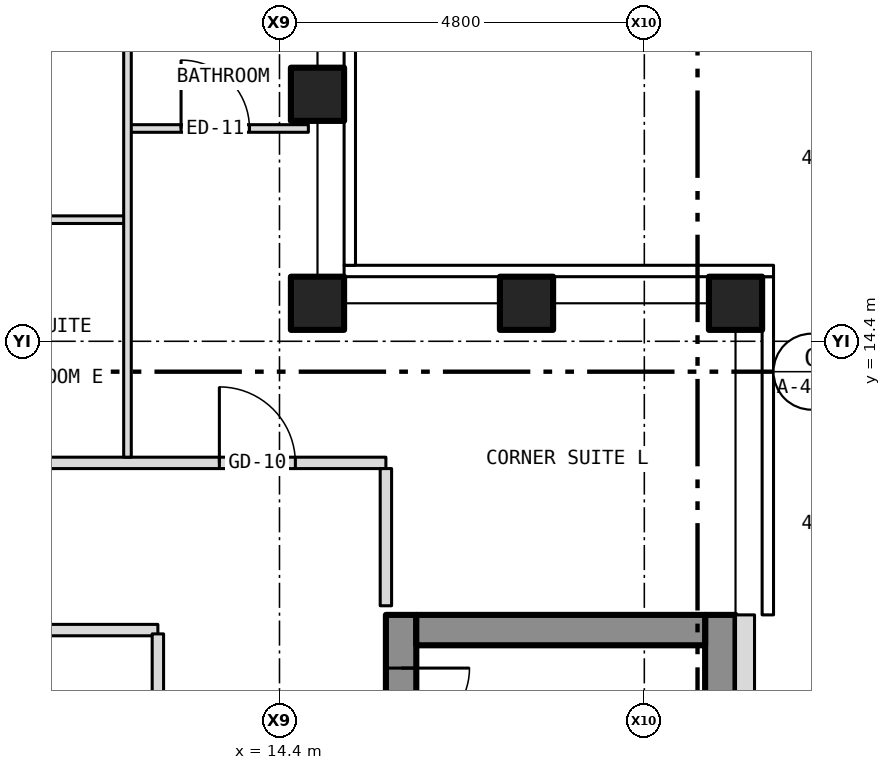
"""IFC4 building model, lengths in metres.
Left out: names, types, materials, properties, quantities, classifications, styles, units other than length and angle.
Written with IfcOpenShell. Run it as: python <this file> out.ifc"""

import sys

from ifc_helpers import new_model, si_unit, direction, frame, frame_2d, origin, origin_2d, place, context, subcontext, project, spatial, rectangle, hollow_rectangle, extrude, element, fill, save


model = new_model("IFC4")
c1 = context("Model", 3, precision=1e-05, world=origin(), true_north=direction((0.0, 1.0)))
c2 = subcontext(c1, "Body", "Model", "MODEL_VIEW")
j1 = project(units=[si_unit("LENGTHUNIT", "METRE"), si_unit("PLANEANGLEUNIT", "RADIAN")], contexts=[c1])
p1 = place(None, origin())
s1 = spatial("IfcSite", under=j1, at=p1, CompositionType="ELEMENT")
p2 = place(p1, origin())
s2 = spatial("IfcBuilding", under=s1, at=p2, CompositionType="ELEMENT")
p3 = place(p2, frame((0.0, 0.0, 208.5)))
s3 = spatial("IfcBuildingStorey", under=s2, at=p3, CompositionType="ELEMENT", Elevation=208.5)
for number, where, z_axis, x_axis in (
    (1, (20.4, 14.9, -0.15), (0.0, 0.0, 1.0), (1.0, 0.0, 0.0)),
    (2, (14.9, 14.9, -0.15), (0.0, 0.0, 1.0), (1.0, 0.0, 0.0)),
    (3, (14.9, 17.65, -0.15), (0.0, 0.0, 1.0), (1.0, 0.0, 0.0)),
    (4, (17.65, 14.9, -0.15), (0.0, 0.0, 1.0), (1.0, 0.0, 0.0)),
):
    element("IfcColumn", number, at=place(p3, frame(where, z_axis=z_axis, x_axis=x_axis)), inside=s3, PredefinedType="COLUMN", context=c2, shape_type="SweptSolid", body=[
        extrude(hollow_rectangle(XDim=0.7, YDim=0.7, WallThickness=0.04, at=origin_2d()), origin(), (0.0, 0.0, 1.0), 3.5),
    ])
p4 = place(p3, frame((16.0, -10.8, 0.0), z_axis=(0.0, 0.0, 1.0), x_axis=(0.0, 1.0, 0.0)))
e5 = element("IfcWall", 5, at=p4, inside=s3, PredefinedType="SHEAR", context=c2, shape_type="SweptSolid", body=[
    extrude(rectangle(XDim=21.6, YDim=0.4, at=frame_2d((10.8, 0.0))), origin(), (0.0, 0.0, 1.0), 3.25),
])
p5 = place(p4, frame((9.4, 0.0, 0.0)))
e6 = element("IfcOpeningElement", 6, at=p5, cuts=e5, PredefinedType="OPENING", context=c2, shape_type="SweptSolid", body=[
    extrude(rectangle(XDim=1.1, YDim=2.1, at=frame_2d((0.55, 1.05))), frame((0.0, 0.212, 0.0), z_axis=(0.0, -1.0, 0.0), x_axis=(1.0, 0.0, 0.0)), (0.0, 0.0, 1.0), 0.424),
])
p6 = place(p4, frame((11.5, 0.0, 0.0)))
e7 = element("IfcOpeningElement", 7, at=p6, cuts=e5, PredefinedType="OPENING", context=c2, shape_type="SweptSolid", body=[
    extrude(rectangle(XDim=1.1, YDim=2.1, at=frame_2d((0.55, 1.05))), frame((0.0, 0.212, 0.0), z_axis=(0.0, -1.0, 0.0), x_axis=(1.0, 0.0, 0.0)), (0.0, 0.0, 1.0), 0.424),
])
p7 = place(p4, frame((13.6, 0.0, 0.0)))
e8 = element("IfcOpeningElement", 8, at=p7, cuts=e5, PredefinedType="OPENING", context=c2, shape_type="SweptSolid", body=[
    extrude(rectangle(XDim=1.1, YDim=2.1, at=frame_2d((0.55, 1.05))), frame((0.0, 0.212, 0.0), z_axis=(0.0, -1.0, 0.0), x_axis=(1.0, 0.0, 0.0)), (0.0, 0.0, 1.0), 0.424),
])
p8 = place(p4, frame((15.7, 0.0, 0.0)))
e9 = element("IfcOpeningElement", 9, at=p8, cuts=e5, PredefinedType="OPENING", context=c2, shape_type="SweptSolid", body=[
    extrude(rectangle(XDim=1.1, YDim=2.1, at=frame_2d((0.55, 1.05))), frame((0.0, 0.212, 0.0), z_axis=(0.0, -1.0, 0.0), x_axis=(1.0, 0.0, 0.0)), (0.0, 0.0, 1.0), 0.424),
])
p9 = place(p4, frame((17.8, 0.0, 0.0)))
e10 = element("IfcOpeningElement", 10, at=p9, cuts=e5, PredefinedType="OPENING", context=c2, shape_type="SweptSolid", body=[
    extrude(rectangle(XDim=1.1, YDim=2.1, at=frame_2d((0.55, 1.05))), frame((0.0, 0.212, 0.0), z_axis=(0.0, -1.0, 0.0), x_axis=(1.0, 0.0, 0.0)), (0.0, 0.0, 1.0), 0.424),
])
p10 = place(p4, frame((5.642, 0.0, 0.0)))
e11 = element("IfcOpeningElement", 11, at=p10, cuts=e5, PredefinedType="OPENING", context=c2, shape_type="SweptSolid", body=[
    extrude(rectangle(XDim=1.1, YDim=2.1, at=frame_2d((0.55, 1.05))), frame((0.0, 0.212, 0.0), z_axis=(0.0, -1.0, 0.0), x_axis=(1.0, 0.0, 0.0)), (0.0, 0.0, 1.0), 0.424),
])
p11 = place(p4, frame((7.5, 0.0, 0.0)))
e12 = element("IfcOpeningElement", 12, at=p11, cuts=e5, PredefinedType="OPENING", context=c2, shape_type="SweptSolid", body=[
    extrude(rectangle(XDim=1.1, YDim=2.1, at=frame_2d((0.55, 1.05))), frame((0.0, 0.212, 0.0), z_axis=(0.0, -1.0, 0.0), x_axis=(1.0, 0.0, 0.0)), (0.0, 0.0, 1.0), 0.424),
])
p12 = place(p4, frame((20.0, 0.0, 0.0)))
e13 = element("IfcOpeningElement", 13, at=p12, cuts=e5, PredefinedType="OPENING", context=c2, shape_type="SweptSolid", body=[
    extrude(rectangle(XDim=0.9, YDim=2.1, at=frame_2d((0.45, 1.05))), frame((0.0, 0.212, 0.0), z_axis=(0.0, -1.0, 0.0), x_axis=(1.0, 0.0, 0.0)), (0.0, 0.0, 1.0), 0.424),
])
p13 = place(p3, frame((20.2, -10.8, 0.0), z_axis=(0.0, 0.0, 1.0), x_axis=(0.0, 1.0, 0.0)))
e14 = element("IfcWall", 14, at=p13, inside=s3, PredefinedType="SHEAR", context=c2, shape_type="SweptSolid", body=[
    extrude(rectangle(XDim=21.6, YDim=0.4, at=frame_2d((10.8, 0.0))), origin(), (0.0, 0.0, 1.0), 3.25),
])
p14 = place(p3, frame((16.2, 10.6, 0.0), z_axis=(0.0, 0.0, 1.0), x_axis=(1.0, 0.0, 0.0)))
e15 = element("IfcWall", 15, at=p14, inside=s3, PredefinedType="SHEAR", context=c2, shape_type="SweptSolid", body=[
    extrude(rectangle(XDim=3.8, YDim=0.4, at=frame_2d((1.9, 0.0))), origin(), (0.0, 0.0, 1.0), 3.25),
])
p15 = place(p3, frame((20.525, -10.8, 0.0), z_axis=(0.0, 0.0, 1.0), x_axis=(0.0, 1.0, 0.0)))
e16 = element("IfcWall", 16, at=p15, inside=s3, PredefinedType="SOLIDWALL", context=c2, shape_type="SweptSolid", body=[
    extrude(rectangle(XDim=21.6, YDim=0.25, at=frame_2d((10.8, 0.0))), origin(), (0.0, 0.0, 1.0), 3.5),
])
p16 = place(p15, frame((2.95, 0.0, 1.0)))
e17 = element("IfcOpeningElement", 17, at=p16, cuts=e16, PredefinedType="OPENING", context=c2, shape_type="SweptSolid", body=[
    extrude(rectangle(XDim=0.6, YDim=1.5, at=frame_2d((0.3, 0.75))), frame((0.0, 0.137, 0.0), z_axis=(0.0, -1.0, 0.0), x_axis=(1.0, 0.0, 0.0)), (0.0, 0.0, 1.0), 0.274),
])
p17 = place(p3, frame((3.3, 10.6, 0.0), z_axis=(0.0, 0.0, 1.0), x_axis=(1.0, 0.0, 0.0)))
e18 = element("IfcWall", 18, at=p17, inside=s3, PredefinedType="PARTITIONING", context=c2, shape_type="SweptSolid", body=[
    extrude(rectangle(XDim=9.5, YDim=0.15, at=frame_2d((4.75, 0.0))), origin(), (0.0, 0.0, 1.0), 3.35),
])
p18 = place(p17, frame((1.925, 0.0, 0.0)))
e19 = element("IfcOpeningElement", 19, at=p18, cuts=e18, PredefinedType="OPENING", context=c2, shape_type="SweptSolid", body=[
    extrude(rectangle(XDim=0.9, YDim=2.1, at=frame_2d((0.45, 1.05))), frame((0.0, 0.087, 0.0), z_axis=(0.0, -1.0, 0.0), x_axis=(1.0, 0.0, 0.0)), (0.0, 0.0, 1.0), 0.174),
])
p19 = place(p3, frame((-15.8, 12.8, 0.0), z_axis=(0.0, 0.0, 1.0), x_axis=(1.0, 0.0, 0.0)))
e20 = element("IfcWall", 20, at=p19, inside=s3, PredefinedType="PARTITIONING", context=c2, shape_type="SweptSolid", body=[
    extrude(rectangle(XDim=31.6, YDim=0.15, at=frame_2d((15.8, 0.0))), origin(), (0.0, 0.0, 1.0), 3.35),
])
p20 = place(p19, frame((5.417, 0.0, 0.0)))
e21 = element("IfcOpeningElement", 21, at=p20, cuts=e20, PredefinedType="OPENING", context=c2, shape_type="SweptSolid", body=[
    extrude(rectangle(XDim=0.9, YDim=2.1, at=frame_2d((0.45, 1.05))), frame((0.0, 0.087, 0.0), z_axis=(0.0, -1.0, 0.0), x_axis=(1.0, 0.0, 0.0)), (0.0, 0.0, 1.0), 0.174),
])
p21 = place(p19, frame((10.384, 0.0, 0.0)))
e22 = element("IfcOpeningElement", 22, at=p21, cuts=e20, PredefinedType="OPENING", context=c2, shape_type="SweptSolid", body=[
    extrude(rectangle(XDim=0.9, YDim=2.1, at=frame_2d((0.45, 1.05))), frame((0.0, 0.087, 0.0), z_axis=(0.0, -1.0, 0.0), x_axis=(1.0, 0.0, 0.0)), (0.0, 0.0, 1.0), 0.174),
])
p22 = place(p19, frame((14.2, 0.0, 0.0)))
e23 = element("IfcOpeningElement", 23, at=p22, cuts=e20, PredefinedType="OPENING", context=c2, shape_type="SweptSolid", body=[
    extrude(rectangle(XDim=1.0, YDim=2.1, at=frame_2d((0.5, 1.05))), frame((0.0, 0.087, 0.0), z_axis=(0.0, -1.0, 0.0), x_axis=(1.0, 0.0, 0.0)), (0.0, 0.0, 1.0), 0.174),
])
p23 = place(p19, frame((19.166, 0.0, 0.0)))
e24 = element("IfcOpeningElement", 24, at=p23, cuts=e20, PredefinedType="OPENING", context=c2, shape_type="SweptSolid", body=[
    extrude(rectangle(XDim=1.0, YDim=2.1, at=frame_2d((0.5, 1.05))), frame((0.0, 0.087, 0.0), z_axis=(0.0, -1.0, 0.0), x_axis=(1.0, 0.0, 0.0)), (0.0, 0.0, 1.0), 0.174),
])
p24 = place(p19, frame((24.134, 0.0, 0.0)))
e25 = element("IfcOpeningElement", 25, at=p24, cuts=e20, PredefinedType="OPENING", context=c2, shape_type="SweptSolid", body=[
    extrude(rectangle(XDim=1.0, YDim=2.1, at=frame_2d((0.5, 1.05))), frame((0.0, 0.087, 0.0), z_axis=(0.0, -1.0, 0.0), x_axis=(1.0, 0.0, 0.0)), (0.0, 0.0, 1.0), 0.174),
])
p25 = place(p19, frame((1.192, 0.0, 0.0)))
e26 = element("IfcOpeningElement", 26, at=p25, cuts=e20, PredefinedType="OPENING", context=c2, shape_type="SweptSolid", body=[
    extrude(rectangle(XDim=1.0, YDim=2.1, at=frame_2d((0.5, 1.05))), frame((0.0, 0.087, 0.0), z_axis=(0.0, -1.0, 0.0), x_axis=(1.0, 0.0, 0.0)), (0.0, 0.0, 1.0), 0.174),
])
p26 = place(p19, frame((29.409, 0.0, 0.0)))
e27 = element("IfcOpeningElement", 27, at=p26, cuts=e20, PredefinedType="OPENING", context=c2, shape_type="SweptSolid", body=[
    extrude(rectangle(XDim=1.0, YDim=2.1, at=frame_2d((0.5, 1.05))), frame((0.0, 0.087, 0.0), z_axis=(0.0, -1.0, 0.0), x_axis=(1.0, 0.0, 0.0)), (0.0, 0.0, 1.0), 0.174),
])
p27 = place(p3, frame((10.2, 16.0, 0.0), z_axis=(0.0, 0.0, 1.0), x_axis=(1.0, 0.0, 0.0)))
e28 = element("IfcWall", 28, at=p27, inside=s3, PredefinedType="PARTITIONING", context=c2, shape_type="SweptSolid", body=[
    extrude(rectangle(XDim=2.2, YDim=0.1, at=frame_2d((1.1, 0.0))), origin(), (0.0, 0.0, 1.0), 3.35),
])
p28 = place(p3, frame((12.4, 17.2, 0.0), z_axis=(0.0, 0.0, 1.0), x_axis=(1.0, 0.0, 0.0)))
e29 = element("IfcWall", 29, at=p28, inside=s3, PredefinedType="PARTITIONING", context=c2, shape_type="SweptSolid", body=[
    extrude(rectangle(XDim=2.38, YDim=0.1, at=frame_2d((1.19, 0.0))), origin(), (0.0, 0.0, 1.0), 3.35),
])
p29 = place(p28, frame((0.705, 0.0, 0.0)))
e30 = element("IfcOpeningElement", 30, at=p29, cuts=e29, PredefinedType="OPENING", context=c2, shape_type="SweptSolid", body=[
    extrude(rectangle(XDim=0.9, YDim=2.1, at=frame_2d((0.45, 1.05))), frame((0.0, 0.062, 0.0), z_axis=(0.0, -1.0, 0.0), x_axis=(1.0, 0.0, 0.0)), (0.0, 0.0, 1.0), 0.124),
])
p30 = place(p3, frame((12.4, 12.875, 0.0), z_axis=(0.0, 0.0, 1.0), x_axis=(0.0, 1.0, 0.0)))
e31 = element("IfcWall", 31, at=p30, inside=s3, PredefinedType="PARTITIONING", context=c2, shape_type="SweptSolid", body=[
    extrude(rectangle(XDim=7.905, YDim=0.1, at=frame_2d((3.953, 0.0))), origin(), (0.0, 0.0, 1.0), 3.35),
])
p31 = place(p3, frame((12.8, 8.175, 0.0), z_axis=(0.0, 0.0, 1.0), x_axis=(0.0, 1.0, 0.0)))
e32 = element("IfcWall", 32, at=p31, inside=s3, PredefinedType="PARTITIONING", context=c2, shape_type="SweptSolid", body=[
    extrude(rectangle(XDim=2.375, YDim=0.15, at=frame_2d((1.188, 0.0))), origin(), (0.0, 0.0, 1.0), 3.35),
])
p32 = place(p3, frame((15.8, 10.92, 0.0), z_axis=(0.0, 0.0, 1.0), x_axis=(0.0, 1.0, 0.0)))
e33 = element("IfcWall", 33, at=p32, inside=s3, PredefinedType="PARTITIONING", context=c2, shape_type="SweptSolid", body=[
    extrude(rectangle(XDim=1.805, YDim=0.15, at=frame_2d((0.903, 0.0))), origin(), (0.0, 0.0, 1.0), 3.35),
])
p33 = place(p12, origin())
e34 = element("IfcDoor", 34, at=p33, inside=s3, OperationType="SINGLE_SWING_RIGHT", PredefinedType="DOOR", context=c2, shape_type="SweptSolid", body=[
    extrude(rectangle(XDim=0.9, YDim=2.1, at=frame_2d((0.45, 1.05))), frame((0.0, 0.025, 0.0), z_axis=(0.0, -1.0, 0.0), x_axis=(1.0, 0.0, 0.0)), (0.0, 0.0, 1.0), 0.05),
])
fill(e13, e34)
p34 = place(p29, origin())
e35 = element("IfcDoor", 35, at=p34, inside=s3, OperationType="SINGLE_SWING_LEFT", PredefinedType="DOOR", context=c2, shape_type="SweptSolid", body=[
    extrude(rectangle(XDim=0.9, YDim=2.1, at=frame_2d((0.45, 1.05))), frame((0.0, 0.025, 0.0), z_axis=(0.0, -1.0, 0.0), x_axis=(1.0, 0.0, 0.0)), (0.0, 0.0, 1.0), 0.05),
])
fill(e30, e35)
p35 = place(p26, origin())
e36 = element("IfcDoor", 36, at=p35, inside=s3, OperationType="SINGLE_SWING_LEFT", PredefinedType="DOOR", context=c2, shape_type="SweptSolid", body=[
    extrude(rectangle(XDim=1.0, YDim=2.1, at=frame_2d((0.5, 1.05))), frame((0.0, 0.025, 0.0), z_axis=(0.0, -1.0, 0.0), x_axis=(1.0, 0.0, 0.0)), (0.0, 0.0, 1.0), 0.05),
])
fill(e27, e36)
save(model, sys.argv[1])
